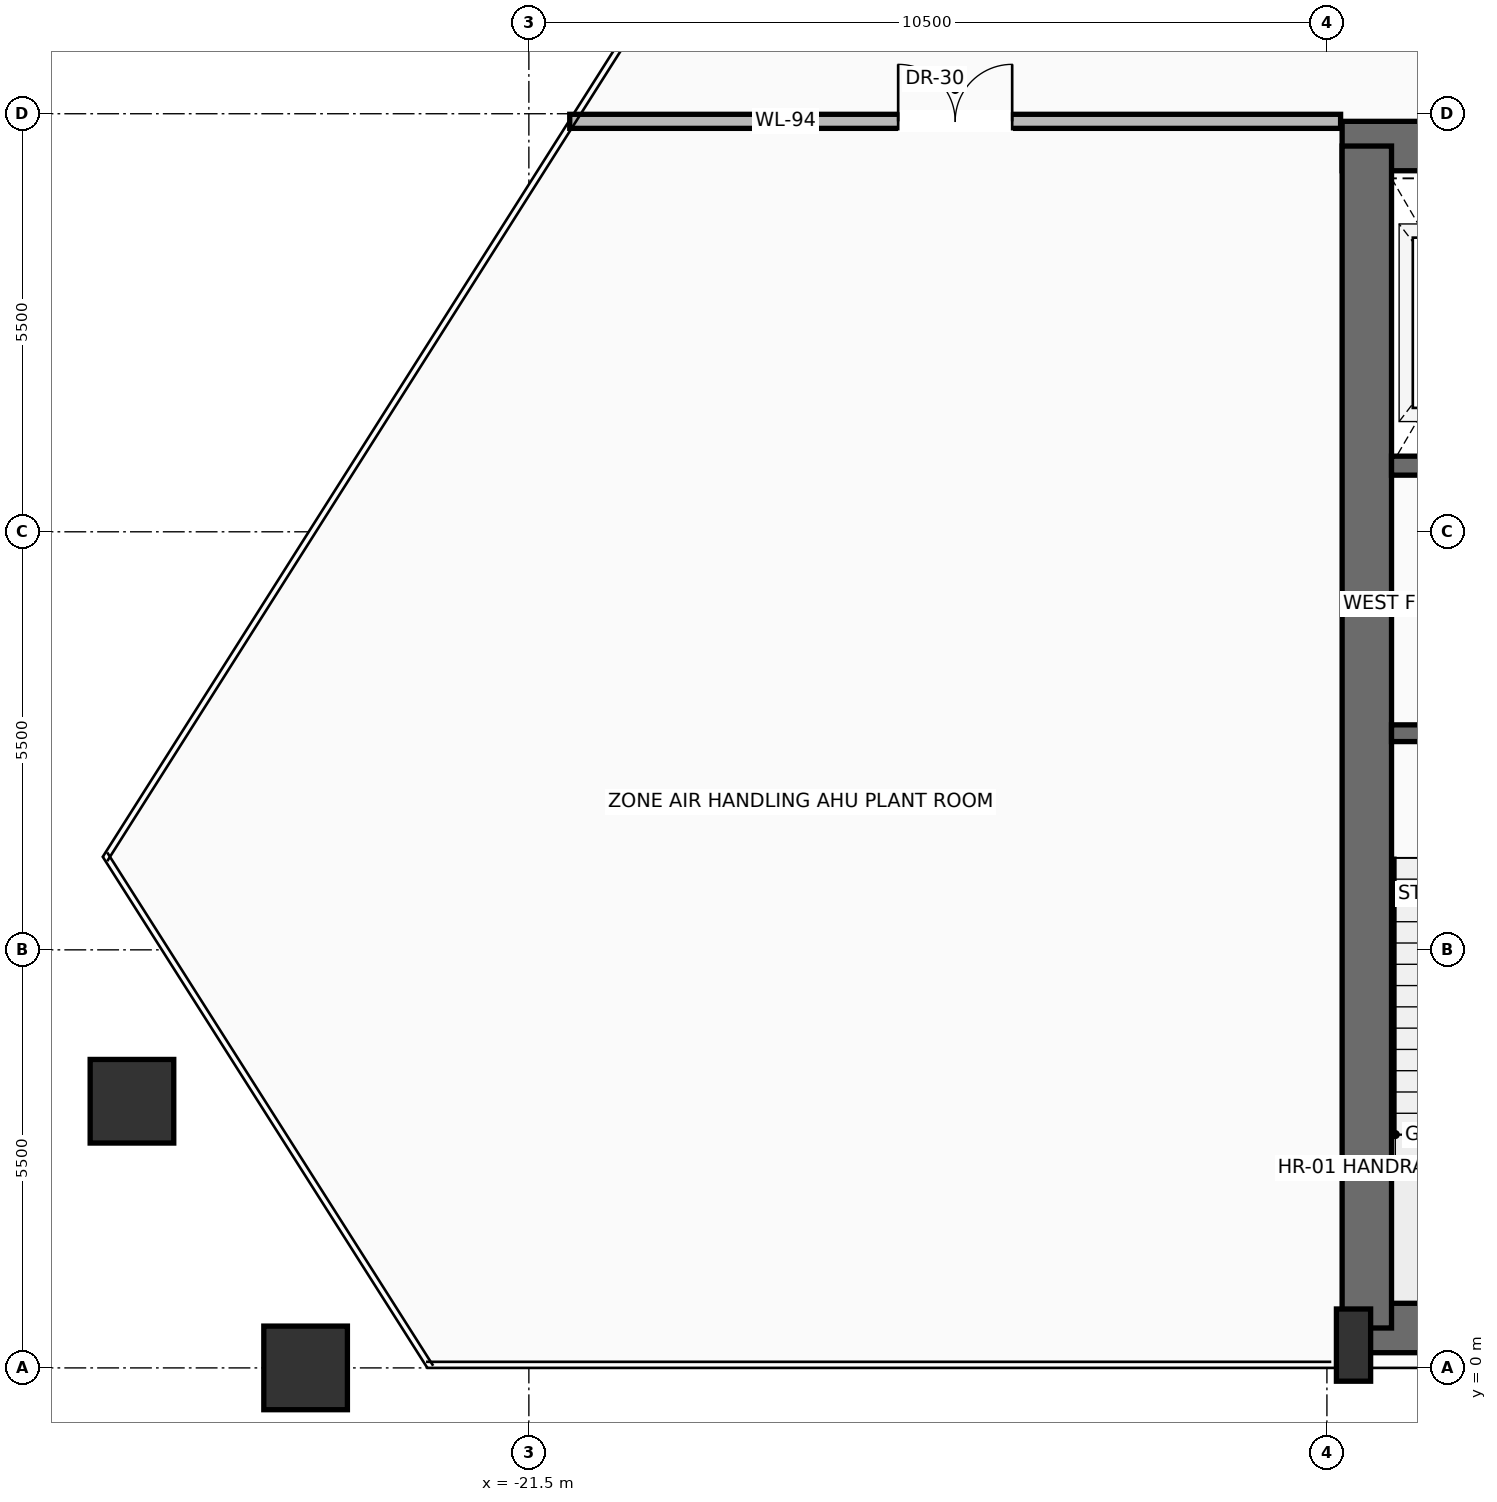
"""IFC4 building model, lengths in metres.
Left out: names, types, materials, properties, quantities, classifications, styles, units other than length and angle.
Written with IfcOpenShell. Run it as: python <this file> out.ifc"""

import sys

from ifc_helpers import new_model, si_unit, direction, frame, frame_2d, origin, origin_2d, place, context, subcontext, project, spatial, rectangle, hollow_rectangle, extrude, source, transform, mapped, element, fill, save


model = new_model("IFC4")
c1 = context("Model", 3, precision=1e-05, world=origin(), true_north=direction((0.0, 1.0)))
c2 = subcontext(c1, "Body", "Model", "MODEL_VIEW")
j1 = project(units=[si_unit("LENGTHUNIT", "METRE"), si_unit("PLANEANGLEUNIT", "RADIAN")], contexts=[c1])
p1 = place(None, origin())
s1 = spatial("IfcSite", under=j1, at=p1, CompositionType="ELEMENT")
p2 = place(p1, origin())
s2 = spatial("IfcBuilding", under=s1, at=p2, CompositionType="ELEMENT")
p3 = place(p2, frame((0.0, 0.0, 166.3)))
s3 = spatial("IfcBuildingStorey", under=s2, at=p3, CompositionType="ELEMENT", Elevation=166.3)
p4 = place(p3, frame((-10.65, 0.525, 0.0), z_axis=(0.0, 0.0, 1.0), x_axis=(1.0, 0.0, 0.0)))
e1 = element("IfcWall", 1, at=p4, inside=s3, PredefinedType="SHEAR", context=c2, shape_type="SweptSolid", body=[
    extrude(rectangle(XDim=21.3, YDim=0.65, at=frame_2d((10.65, 0.0))), origin(), (0.0, 0.0, 1.0), 4.47),
])
p5 = place(p3, frame((-10.8, 16.075, 0.0), z_axis=(0.0, 0.0, 1.0), x_axis=(1.0, 0.0, 0.0)))
e2 = element("IfcWall", 2, at=p5, inside=s3, PredefinedType="SHEAR", context=c2, shape_type="SweptSolid", body=[
    extrude(rectangle(XDim=21.6, YDim=0.65, at=frame_2d((10.8, 0.0))), origin(), (0.0, 0.0, 1.0), 4.47),
])
p6 = place(p5, frame((3.37, 0.0, 0.0)))
e3 = element("IfcOpeningElement", 3, at=p6, cuts=e2, PredefinedType="OPENING", context=c2, shape_type="SweptSolid", body=[
    extrude(rectangle(XDim=1.3, YDim=2.3, at=frame_2d((0.65, 1.15))), frame((0.0, 0.335, 0.0), z_axis=(0.0, -1.0, 0.0), x_axis=(1.0, 0.0, 0.0)), (0.0, 0.0, 1.0), 0.67),
])
p7 = place(p5, frame((9.8, 0.0, 0.0)))
e4 = element("IfcOpeningElement", 4, at=p7, cuts=e2, PredefinedType="OPENING", context=c2, shape_type="SweptSolid", body=[
    extrude(rectangle(XDim=2.0, YDim=2.4, at=frame_2d((1.0, 1.2))), frame((0.0, 0.335, 0.0), z_axis=(0.0, -1.0, 0.0), x_axis=(1.0, 0.0, 0.0)), (0.0, 0.0, 1.0), 0.67),
])
p8 = place(p3, frame((-10.475, 0.525, 0.0), z_axis=(0.0, 0.0, 1.0), x_axis=(0.0, 1.0, 0.0)))
e5 = element("IfcWall", 5, at=p8, inside=s3, PredefinedType="SHEAR", context=c2, shape_type="SweptSolid", body=[
    extrude(rectangle(XDim=15.55, YDim=0.65, at=frame_2d((7.775, 0.0))), origin(), (0.0, 0.0, 1.0), 4.47),
])
m1 = source(origin(), c2, "Body", "SweptSolid", [
    extrude(rectangle(XDim=0.45, YDim=0.95, at=origin_2d()), origin(), (0.0, 0.0, 1.0), 4.7),
])
p9 = place(p3, frame((-10.65, 0.3, 0.0), z_axis=(0.0, 0.0, 1.0), x_axis=(1.0, 0.0, 0.0)))
e6 = element("IfcColumn", 6, at=p9, inside=s3, PredefinedType="PILASTER", context=c2, shape_type="MappedRepresentation", body=[
    mapped(m1, transform((0.0, 0.0, 0.0), scale=1.0)),
])
m2 = source(origin(), c2, "Body", "SweptSolid", [
    extrude(hollow_rectangle(XDim=1.1, YDim=1.1, WallThickness=0.055, at=origin_2d()), origin(), (0.0, 0.0, 1.0), 4.691),
])
p10 = place(p3, frame((-24.438, 0.0, 0.004), z_axis=(-0.008690798497, 0.0, 0.999962234298), x_axis=(0.0, -1.0, 0.0)))
e7 = element("IfcColumn", 7, at=p10, inside=s3, PredefinedType="COLUMN", context=c2, shape_type="MappedRepresentation", body=[
    mapped(m2, transform((0.0, 0.0, 0.0), scale=1.0)),
])
m3 = source(origin(), c2, "Body", "SweptSolid", [
    extrude(hollow_rectangle(XDim=1.1, YDim=1.1, WallThickness=0.055, at=origin_2d()), origin(), (0.0, 0.0, 1.0), 4.692),
])
p11 = place(p3, frame((-26.722, 3.508, 0.004), z_axis=(0.001717192258, -0.015766947098, 0.999874219405), x_axis=(0.994121454153, 0.108270653423, 0.0)))
e8 = element("IfcColumn", 8, at=p11, inside=s3, PredefinedType="COLUMN", context=c2, shape_type="MappedRepresentation", body=[
    mapped(m3, transform((0.0, 0.0, 0.0), scale=1.0)),
])
p12 = place(p3, frame((-5.5, 8.35, 0.0), z_axis=(0.0, 0.0, 1.0), x_axis=(-1.0, 0.0, 0.0)))
e9 = element("IfcWall", 9, at=p12, inside=s3, PredefinedType="SOLIDWALL", context=c2, shape_type="SweptSolid", body=[
    extrude(rectangle(XDim=4.65, YDim=0.22, at=frame_2d((2.325, 0.0))), origin(), (0.0, 0.0, 1.0), 4.47),
])
p13 = place(p12, frame((2.5, 0.0, 0.0)))
e10 = element("IfcOpeningElement", 10, at=p13, cuts=e9, PredefinedType="OPENING", context=c2, shape_type="SweptSolid", body=[
    extrude(rectangle(XDim=1.15, YDim=2.2, at=frame_2d((0.575, 1.1))), frame((0.0, 0.12, 0.0), z_axis=(0.0, -1.0, 0.0), x_axis=(1.0, 0.0, 0.0)), (0.0, 0.0, 1.0), 0.24),
])
p14 = place(p3, frame((-5.5, 11.87, 0.0), z_axis=(0.0, 0.0, 1.0), x_axis=(-1.0, 0.0, 0.0)))
e11 = element("IfcWall", 11, at=p14, inside=s3, PredefinedType="SOLIDWALL", context=c2, shape_type="SweptSolid", body=[
    extrude(rectangle(XDim=4.65, YDim=0.25, at=frame_2d((2.325, 0.0))), origin(), (0.0, 0.0, 1.0), 4.47),
])
p15 = place(p14, frame((2.95, 0.0, 0.0)))
e12 = element("IfcOpeningElement", 12, at=p15, cuts=e11, PredefinedType="OPENING", context=c2, shape_type="SweptSolid", body=[
    extrude(rectangle(XDim=1.2, YDim=2.25, at=frame_2d((0.6, 1.125))), frame((0.0, 0.135, 0.0), z_axis=(0.0, -1.0, 0.0), x_axis=(1.0, 0.0, 0.0)), (0.0, 0.0, 1.0), 0.27),
])
p16 = place(p3, frame((-20.962, 16.4, 0.0), z_axis=(0.0, 0.0, 1.0), x_axis=(1.0, 0.0, 0.0)))
e13 = element("IfcWall", 13, at=p16, inside=s3, PredefinedType="PARTITIONING", context=c2, shape_type="SweptSolid", body=[
    extrude(rectangle(XDim=10.142, YDim=0.185, at=frame_2d((5.071, 0.0))), origin(), (0.0, 0.0, 1.0), 4.462),
])
p17 = place(p16, frame((4.321, 0.0, 0.0)))
e14 = element("IfcOpeningElement", 14, at=p17, cuts=e13, PredefinedType="OPENING", context=c2, shape_type="SweptSolid", body=[
    extrude(rectangle(XDim=1.5, YDim=2.25, at=frame_2d((0.75, 1.125))), frame((0.0, 0.103, 0.0), z_axis=(0.0, -1.0, 0.0), x_axis=(1.0, 0.0, 0.0)), (0.0, 0.0, 1.0), 0.205),
])
m4 = source(origin(), c2, "Body", "SweptSolid", [
    extrude(rectangle(XDim=1.5, YDim=2.25, at=frame_2d((0.75, 1.125))), frame((0.0, 0.025, 0.0), z_axis=(0.0, -1.0, 0.0), x_axis=(1.0, 0.0, 0.0)), (0.0, 0.0, 1.0), 0.05),
])
p18 = place(p17, origin())
e15 = element("IfcDoor", 15, at=p18, inside=s3, OperationType="DOUBLE_DOOR_SINGLE_SWING", PredefinedType="DOOR", context=c2, shape_type="MappedRepresentation", body=[
    mapped(m4, transform((0.0, 0.0, 0.0), scale=1.0)),
])
fill(e14, e15)
save(model, sys.argv[1])
